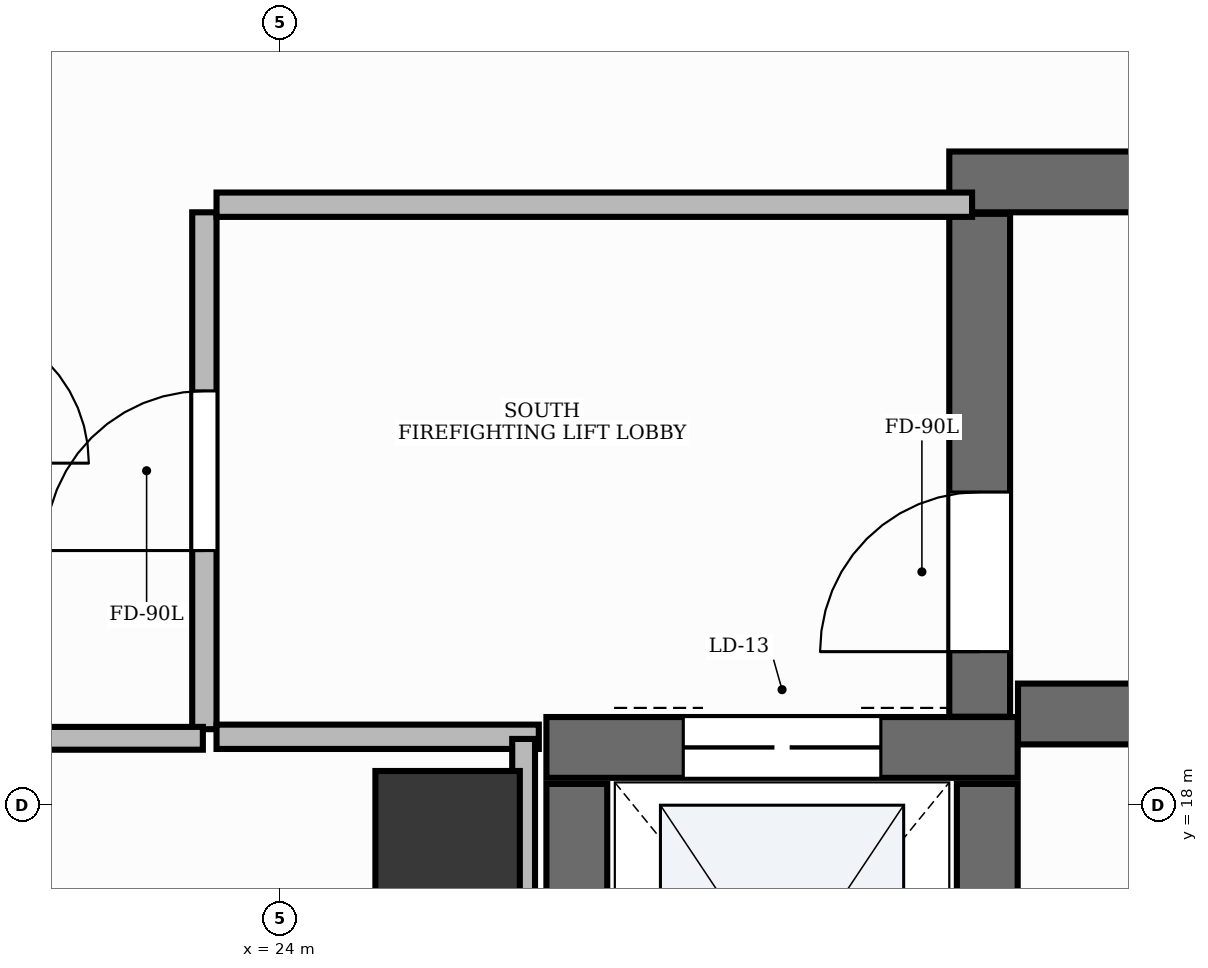
"""IFC4 building model, lengths in metres.
Left out: names, types, materials, properties, quantities, classifications, styles, units other than length and angle.
Written with IfcOpenShell. Run it as: python <this file> out.ifc"""

import sys

from ifc_helpers import new_model, si_unit, direction, frame, frame_2d, origin, origin_2d, place, context, subcontext, project, spatial, rectangle, extrude, element, fill, save


model = new_model("IFC4")
c1 = context("Model", 3, precision=1e-05, world=origin(), true_north=direction((0.0, 1.0)))
c2 = subcontext(c1, "Body", "Model", "MODEL_VIEW")
j1 = project(units=[si_unit("LENGTHUNIT", "METRE"), si_unit("PLANEANGLEUNIT", "RADIAN")], contexts=[c1])
p1 = place(None, origin())
s1 = spatial("IfcSite", under=j1, at=p1, CompositionType="ELEMENT")
p2 = place(p1, origin())
s2 = spatial("IfcBuilding", under=s1, at=p2, CompositionType="ELEMENT")
p3 = place(p2, frame((0.0, 0.0, 218.4)))
s3 = spatial("IfcBuildingStorey", under=s2, at=p3, CompositionType="ELEMENT", Elevation=218.4)
p4 = place(p3, frame((28.852, 18.6, 0.0), z_axis=(0.0, 0.0, 1.0), x_axis=(1.0, 0.0, 0.0)))
e1 = element("IfcWall", 1, at=p4, inside=s3, PredefinedType="SHEAR", context=c2, shape_type="SweptSolid", body=[
    extrude(rectangle(XDim=8.198, YDim=0.4, at=frame_2d((4.099, 0.0))), origin(), (0.0, 0.0, 1.0), 3.9),
])
p5 = place(p3, frame((28.4, 22.1, 0.0), z_axis=(0.0, 0.0, 1.0), x_axis=(1.0, 0.0, 0.0)))
e2 = element("IfcWall", 2, at=p5, inside=s3, PredefinedType="SHEAR", context=c2, shape_type="SweptSolid", body=[
    extrude(rectangle(XDim=8.65, YDim=0.4, at=frame_2d((4.325, 0.0))), origin(), (0.0, 0.0, 1.0), 3.9),
])
p6 = place(p3, frame((28.6, 18.582, 0.0), z_axis=(0.0, 0.0, 1.0), x_axis=(0.0, 1.0, 0.0)))
e3 = element("IfcWall", 3, at=p6, inside=s3, PredefinedType="SHEAR", context=c2, shape_type="SweptSolid", body=[
    extrude(rectangle(XDim=3.308, YDim=0.4, at=frame_2d((1.654, 0.0))), origin(), (0.0, 0.0, 1.0), 3.9),
])
p7 = place(p6, frame((0.428, 0.0, 0.0)))
e4 = element("IfcOpeningElement", 4, at=p7, cuts=e3, PredefinedType="OPENING", context=c2, shape_type="SweptSolid", body=[
    extrude(rectangle(XDim=1.05, YDim=2.15, at=frame_2d((0.525, 1.075))), frame((0.0, 0.215, 0.0), z_axis=(0.0, -1.0, 0.0), x_axis=(1.0, 0.0, 0.0)), (0.0, 0.0, 1.0), 0.43),
])
p8 = place(p3, frame((25.75, 18.38, 0.0), z_axis=(0.0, 0.0, 1.0), x_axis=(1.0, 0.0, 0.0)))
e5 = element("IfcWall", 5, at=p8, inside=s3, PredefinedType="SHEAR", context=c2, shape_type="SweptSolid", body=[
    extrude(rectangle(XDim=3.1, YDim=0.4, at=frame_2d((1.55, 0.0))), origin(), (0.0, 0.0, 1.0), 3.9),
])
p9 = place(p8, frame((0.9, 0.0, 0.0)))
e6 = element("IfcOpeningElement", 6, at=p9, cuts=e5, PredefinedType="OPENING", context=c2, shape_type="SweptSolid", body=[
    extrude(rectangle(XDim=1.3, YDim=2.2, at=frame_2d((0.65, 1.1))), frame((0.0, 0.215, 0.0), z_axis=(0.0, -1.0, 0.0), x_axis=(1.0, 0.0, 0.0)), (0.0, 0.0, 1.0), 0.43),
])
for number, where, z_axis, x_axis in (
    (7, (25.95, 15.44, 0.0), (0.0, 0.0, 1.0), (0.0, 1.0, 0.0)),
    (8, (28.65, 15.44, 0.0), (0.0, 0.0, 1.0), (0.0, 1.0, 0.0)),
):
    element("IfcWall", number, at=place(p3, frame(where, z_axis=z_axis, x_axis=x_axis)), inside=s3, PredefinedType="SHEAR", context=c2, shape_type="SweptSolid", body=[
        extrude(rectangle(XDim=2.7, YDim=0.4, at=frame_2d((1.35, 0.0))), origin(), (0.0, 0.0, 1.0), 3.9),
    ])
p10 = place(p3, frame((25.1, 17.75, -0.0), z_axis=(0.0, 0.0, 1.0), x_axis=(1.0, 0.0, 0.0)))
e9 = element("IfcColumn", 9, at=p10, inside=s3, PredefinedType="PILASTER", context=c2, shape_type="SweptSolid", body=[
    extrude(rectangle(XDim=0.95, YDim=0.95, at=origin_2d()), origin(), (0.0, 0.0, 1.0), 3.901),
])
p11 = place(p3, frame((23.5, 18.5, 0.0), z_axis=(0.0, 0.0, 1.0), x_axis=(0.0, 1.0, 0.0)))
e10 = element("IfcWall", 10, at=p11, inside=s3, PredefinedType="PARTITIONING", context=c2, shape_type="SweptSolid", body=[
    extrude(rectangle(XDim=3.4, YDim=0.16, at=frame_2d((1.7, 0.0))), origin(), (0.0, 0.0, 1.0), 2.91),
])
p12 = place(p11, frame((1.175, 0.0, 0.0)))
e11 = element("IfcOpeningElement", 11, at=p12, cuts=e10, PredefinedType="OPENING", context=c2, shape_type="SweptSolid", body=[
    extrude(rectangle(XDim=1.05, YDim=2.15, at=frame_2d((0.525, 1.075))), frame((0.0, 0.095, 0.0), z_axis=(0.0, -1.0, 0.0), x_axis=(1.0, 0.0, 0.0)), (0.0, 0.0, 1.0), 0.19),
])
p13 = place(p3, frame((23.58, 21.95, 0.0), z_axis=(0.0, 0.0, 1.0), x_axis=(1.0, 0.0, 0.0)))
e12 = element("IfcWall", 12, at=p13, inside=s3, PredefinedType="PARTITIONING", context=c2, shape_type="SweptSolid", body=[
    extrude(rectangle(XDim=4.97, YDim=0.16, at=frame_2d((2.485, 0.0))), origin(), (0.0, 0.0, 1.0), 2.91),
])
p14 = place(p3, frame((23.58, 18.45, 0.0), z_axis=(0.0, 0.0, 1.0), x_axis=(1.0, 0.0, 0.0)))
e13 = element("IfcWall", 13, at=p14, inside=s3, PredefinedType="PARTITIONING", context=c2, shape_type="SweptSolid", body=[
    extrude(rectangle(XDim=2.12, YDim=0.16, at=frame_2d((1.06, 0.0))), origin(), (0.0, 0.0, 1.0), 2.91),
])
p15 = place(p3, frame((21.8, 18.44, 0.0), z_axis=(0.0, 0.0, 1.0), x_axis=(1.0, 0.0, 0.0)))
e14 = element("IfcWall", 14, at=p15, inside=s3, PredefinedType="PARTITIONING", context=c2, shape_type="SweptSolid", body=[
    extrude(rectangle(XDim=1.69, YDim=0.15, at=frame_2d((0.845, 0.0))), origin(), (0.0, 0.0, 1.0), 2.91),
])
p16 = place(p3, frame((25.6, 18.436, 0.0), z_axis=(0.0, 0.0, 1.0), x_axis=(0.0, -1.0, 0.0)))
e15 = element("IfcWall", 15, at=p16, inside=s3, PredefinedType="PARTITIONING", context=c2, shape_type="SweptSolid", body=[
    extrude(rectangle(XDim=2.026, YDim=0.15, at=frame_2d((1.013, 0.0))), origin(), (0.0, 0.0, 1.0), 2.91),
])
p17 = place(p7, origin())
e16 = element("IfcDoor", 16, at=p17, inside=s3, OperationType="SINGLE_SWING_LEFT", PredefinedType="DOOR", context=c2, shape_type="SweptSolid", body=[
    extrude(rectangle(XDim=1.05, YDim=2.15, at=frame_2d((0.525, 1.075))), frame((0.0, 0.025, 0.0), z_axis=(0.0, -1.0, 0.0), x_axis=(1.0, 0.0, 0.0)), (0.0, 0.0, 1.0), 0.05),
])
fill(e4, e16)
p18 = place(p9, origin())
e17 = element("IfcDoor", 17, at=p18, inside=s3, OperationType="DOUBLE_DOOR_SLIDING", PredefinedType="DOOR", context=c2, shape_type="SweptSolid", body=[
    extrude(rectangle(XDim=1.3, YDim=2.2, at=frame_2d((0.65, 1.1))), frame((0.0, 0.025, 0.0), z_axis=(0.0, -1.0, 0.0), x_axis=(1.0, 0.0, 0.0)), (0.0, 0.0, 1.0), 0.05),
])
fill(e6, e17)
p19 = place(p12, origin())
e18 = element("IfcDoor", 18, at=p19, inside=s3, OperationType="SINGLE_SWING_LEFT", PredefinedType="DOOR", context=c2, shape_type="SweptSolid", body=[
    extrude(rectangle(XDim=1.05, YDim=2.15, at=frame_2d((0.525, 1.075))), frame((0.0, 0.025, 0.0), z_axis=(0.0, -1.0, 0.0), x_axis=(1.0, 0.0, 0.0)), (0.0, 0.0, 1.0), 0.05),
])
fill(e11, e18)
save(model, sys.argv[1])
